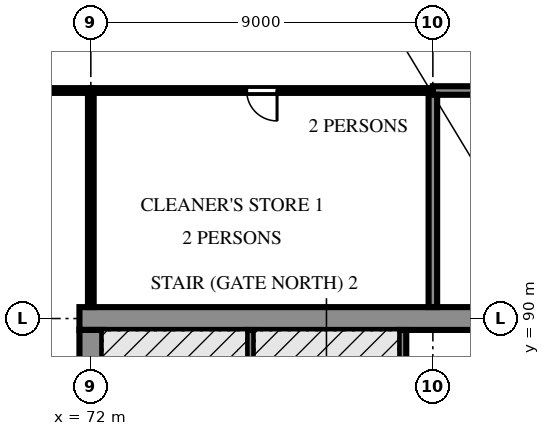
"""IFC4 building model, lengths in metres.
Left out: names, types, materials, properties, quantities, classifications, styles, units other than length and angle.
Written with IfcOpenShell. Run it as: python <this file> out.ifc"""

import sys

from ifc_helpers import new_model, si_unit, direction, frame, frame_2d, origin, place, context, subcontext, project, spatial, polyline, rectangle, outline, extrude, element, fill, save


model = new_model("IFC4")
c1 = context("Model", 3, precision=1e-05, world=origin(), true_north=direction((0.0, 1.0)))
c2 = subcontext(c1, "Body", "Model", "MODEL_VIEW")
j1 = project(units=[si_unit("LENGTHUNIT", "METRE"), si_unit("PLANEANGLEUNIT", "RADIAN")], contexts=[c1])
p1 = place(None, origin())
s1 = spatial("IfcSite", under=j1, at=p1, CompositionType="ELEMENT")
p2 = place(p1, origin())
s2 = spatial("IfcBuilding", under=s1, at=p2, CompositionType="ELEMENT")
p3 = place(p2, origin())
s3 = spatial("IfcBuildingStorey", under=s2, at=p3, CompositionType="ELEMENT", Elevation=0.0)
p4 = place(p3, frame((71.7, 90.0, -2.1), z_axis=(0.0, 0.0, 1.0), x_axis=(1.0, 0.0, 0.0)))
e1 = element("IfcWall", 1, at=p4, inside=s3, PredefinedType="SOLIDWALL", context=c2, shape_type="SweptSolid", body=[
    extrude(rectangle(XDim=18.6, YDim=0.6, at=frame_2d((9.3, 0.0))), origin(), (0.0, 0.0, 1.0), 9.6),
])
p5 = place(p3, frame((72.0, 81.3, -2.1), z_axis=(0.0, 0.0, 1.0), x_axis=(0.0, 1.0, 0.0)))
e2 = element("IfcWall", 2, at=p5, inside=s3, PredefinedType="SOLIDWALL", context=c2, shape_type="SweptSolid", body=[
    extrude(rectangle(XDim=8.4, YDim=0.6, at=frame_2d((4.2, 0.0))), origin(), (0.0, 0.0, 1.0), 9.6),
])
for number, where, z_axis, x_axis in (
    (3, (76.2, 81.302, 0.0), (0.0, 0.0, 1.0), (0.0, 1.0, 0.0)),
    (4, (80.2, 81.302, 0.0), (0.0, 0.0, 1.0), (0.0, 1.0, 0.0)),
):
    element("IfcWall", number, at=place(p3, frame(where, z_axis=z_axis, x_axis=x_axis)), inside=s3, PredefinedType="SOLIDWALL", context=c2, shape_type="SweptSolid", body=[
        extrude(rectangle(XDim=8.396, YDim=0.2, at=frame_2d((4.198, 0.0))), origin(), (0.0, 0.0, 1.0), 6.836),
    ])
p6 = place(p3, frame((72.0, 96.0, 0.0), z_axis=(0.0, 0.0, 1.0), x_axis=(-1.0, 0.0, 0.0)))
e5 = element("IfcWall", 5, at=p6, inside=s3, PredefinedType="PARTITIONING", context=c2, shape_type="SweptSolid", body=[
    extrude(rectangle(XDim=8.858, YDim=0.125, at=frame_2d((4.429, 0.0))), origin(), (0.0, 0.0, 1.0), 6.757),
])
p7 = place(p6, frame((4.0, 0.0, 0.0)))
e6 = element("IfcOpeningElement", 6, at=p7, cuts=e5, PredefinedType="OPENING", context=c2, shape_type="SweptSolid", body=[
    extrude(rectangle(XDim=1.0, YDim=2.1, at=frame_2d((0.5, 1.05))), frame((0.0, 0.073, 0.0), z_axis=(0.0, -1.0, 0.0), x_axis=(1.0, 0.0, 0.0)), (0.0, 0.0, 1.0), 0.145),
])
p8 = place(p3, frame((90.0, 96.0, 0.0), z_axis=(0.0, 0.0, 1.0), x_axis=(-1.0, 0.0, 0.0)))
e7 = element("IfcWall", 7, at=p8, inside=s3, PredefinedType="PARTITIONING", context=c2, shape_type="SweptSolid", body=[
    extrude(rectangle(XDim=9.0, YDim=0.225, at=frame_2d((4.5, 0.0))), origin(), (0.0, 0.0, 1.0), 6.6),
])
p9 = place(p8, frame((3.9, 0.0, 0.0)))
e8 = element("IfcOpeningElement", 8, at=p9, cuts=e7, PredefinedType="OPENING", context=c2, shape_type="SweptSolid", body=[
    extrude(rectangle(XDim=1.2, YDim=2.4, at=frame_2d((0.6, 1.2))), frame((0.0, 0.123, 0.0), z_axis=(0.0, -1.0, 0.0), x_axis=(1.0, 0.0, 0.0)), (0.0, 0.0, 1.0), 0.245),
])
p10 = place(p3, frame((81.0, 96.0, 0.0), z_axis=(0.0, 0.0, 1.0), x_axis=(-1.0, 0.0, 0.0)))
e9 = element("IfcWall", 9, at=p10, inside=s3, PredefinedType="PARTITIONING", context=c2, shape_type="SweptSolid", body=[
    extrude(rectangle(XDim=9.0, YDim=0.125, at=frame_2d((4.5, 0.0))), origin(), (0.0, 0.0, 1.0), 6.757),
])
p11 = place(p10, frame((4.1, 0.0, 0.0)))
e10 = element("IfcOpeningElement", 10, at=p11, cuts=e9, PredefinedType="OPENING", context=c2, shape_type="SweptSolid", body=[
    extrude(rectangle(XDim=0.8, YDim=2.1, at=frame_2d((0.4, 1.05))), frame((0.0, 0.073, 0.0), z_axis=(0.0, -1.0, 0.0), x_axis=(1.0, 0.0, 0.0)), (0.0, 0.0, 1.0), 0.145),
])
p12 = place(p3, frame((72.0, 95.938, 0.0), z_axis=(0.0, 0.0, 1.0), x_axis=(0.0, -1.0, 0.0)))
e11 = element("IfcWall", 11, at=p12, inside=s3, PredefinedType="PARTITIONING", context=c2, shape_type="SweptSolid", body=[
    extrude(rectangle(XDim=5.635, YDim=0.15, at=frame_2d((2.818, 0.0))), origin(), (0.0, 0.0, 1.0), 6.6),
])
p13 = place(p3, frame((81.0, 95.887, 0.0), z_axis=(0.0, 0.0, 1.0), x_axis=(0.0, -1.0, 0.0)))
e12 = element("IfcWall", 12, at=p13, inside=s3, PredefinedType="PARTITIONING", context=c2, shape_type="SweptSolid", body=[
    extrude(rectangle(XDim=5.585, YDim=0.225, at=frame_2d((2.793, 0.0))), origin(), (0.0, 0.0, 1.0), 6.6),
])
p14 = place(p11, origin())
e13 = element("IfcDoor", 13, at=p14, inside=s3, OperationType="SINGLE_SWING_LEFT", PredefinedType="DOOR", context=c2, shape_type="SweptSolid", body=[
    extrude(outline(polyline([(0.0, 0.0), (0.07, 0.0), (0.07, 2.03), (0.73, 2.03), (0.73, 0.0), (0.8, 0.0), (0.8, 2.1), (0.0, 2.1), (0.0, 0.0)])), frame((0.0, 0.025, 0.0), z_axis=(0.0, -1.0, 0.0), x_axis=(1.0, 0.0, 0.0)), (0.0, 0.0, 1.0), 0.05),
    extrude(outline(polyline([(0.074, 0.01), (0.726, 0.01), (0.726, 2.026), (0.074, 2.026), (0.074, 0.01)]), holes=[polyline([(0.194, 0.16), (0.606, 0.16), (0.606, 1.01), (0.194, 1.01), (0.194, 0.16)]), polyline([(0.25, 1.16), (0.55, 1.16), (0.55, 1.76), (0.25, 1.76), (0.25, 1.16)])]), frame((0.0, 0.017, 0.0), z_axis=(0.0, -1.0, 0.0), x_axis=(1.0, 0.0, 0.0)), (0.0, 0.0, 1.0), 0.035),
    extrude(rectangle(XDim=0.412, YDim=0.85, at=frame_2d((0.4, 0.585))), frame((0.0, 0.009, 0.0), z_axis=(0.0, -1.0, 0.0), x_axis=(1.0, 0.0, 0.0)), (0.0, 0.0, 1.0), 0.017),
    extrude(rectangle(XDim=0.3, YDim=0.6, at=frame_2d((0.4, 1.46))), frame((0.0, 0.006, 0.0), z_axis=(0.0, -1.0, 0.0), x_axis=(1.0, 0.0, 0.0)), (0.0, 0.0, 1.0), 0.012),
])
fill(e10, e13)
save(model, sys.argv[1])
